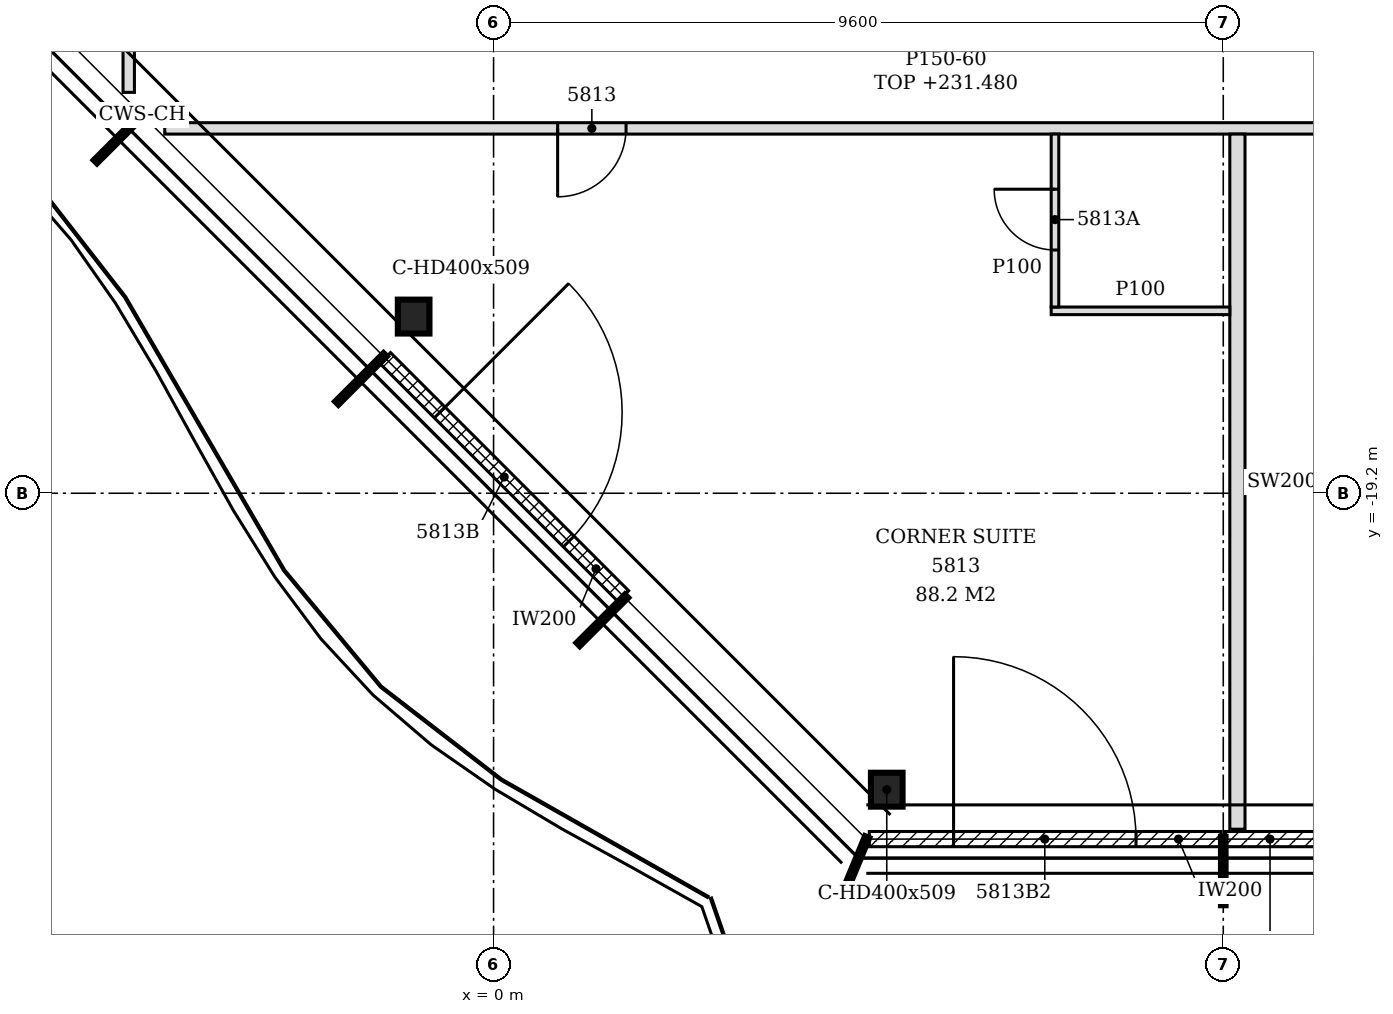
"""IFC4 building model, lengths in metres.
Left out: names, types, materials, properties, quantities, classifications, styles, units other than length and angle.
Written with IfcOpenShell. Run it as: python <this file> out.ifc"""

import sys

from ifc_helpers import new_model, si_unit, direction, frame, frame_2d, origin, origin_2d, place, context, subcontext, project, spatial, polyline, rectangle, i_section, outline, extrude, element, fill, save


model = new_model("IFC4")
c1 = context("Model", 3, precision=1e-05, world=origin(), true_north=direction((0.0, 1.0)))
c2 = subcontext(c1, "Body", "Model", "MODEL_VIEW")
j1 = project(units=[si_unit("LENGTHUNIT", "METRE"), si_unit("PLANEANGLEUNIT", "RADIAN")], contexts=[c1])
p1 = place(None, origin())
s1 = spatial("IfcSite", under=j1, at=p1, CompositionType="ELEMENT")
p2 = place(p1, origin())
s2 = spatial("IfcBuilding", under=s1, at=p2, CompositionType="ELEMENT")
p3 = place(p2, frame((0.0, 0.0, 228.6)))
s3 = spatial("IfcBuildingStorey", under=s2, at=p3, CompositionType="ELEMENT", Elevation=228.6)
for number, where, z_axis, x_axis in (
    (1, (5.173, -23.1, -0.15), (0.0, 0.0, 1.0), (1.0, 0.0, 0.0)),
    (2, (-1.052, -16.876, -0.15), (0.0, 0.0, 1.0), (1.0, 0.0, 0.0)),
):
    element("IfcColumn", number, at=place(p3, frame(where, z_axis=z_axis, x_axis=x_axis)), inside=s3, PredefinedType="COLUMN", context=c2, shape_type="SweptSolid", body=[
        extrude(i_section(OverallWidth=0.416, OverallDepth=0.446, WebThickness=0.039, FlangeThickness=0.063, FilletRadius=0.015, at=origin_2d()), origin(), (0.0, 0.0, 1.0), 3.6),
    ])
p4 = place(p3, frame((4.944, -23.75, 0.0), z_axis=(0.0, 0.0, 1.0), x_axis=(1.0, 0.0, 0.0)))
e3 = element("IfcWall", 3, at=p4, inside=s3, PredefinedType="NOTDEFINED", context=c2, shape_type="SweptSolid", body=[
    extrude(rectangle(XDim=4.626, YDim=0.2, at=frame_2d((2.313, 0.0))), origin(), (0.0, 0.0, 1.0), 3.45),
])
p5 = place(p4, frame((1.108, 0.0, 0.0)))
e4 = element("IfcOpeningElement", 4, at=p5, cuts=e3, PredefinedType="OPENING", context=c2, shape_type="SweptSolid", body=[
    extrude(rectangle(XDim=2.4, YDim=2.4, at=frame_2d((1.2, 1.2))), frame((0.0, 0.11, 0.0), z_axis=(0.0, -1.0, 0.0), x_axis=(1.0, 0.0, 0.0)), (0.0, 0.0, 1.0), 0.22),
])
p6 = place(p3, frame((9.63, -23.75, 0.0), z_axis=(0.0, 0.0, 1.0), x_axis=(1.0, 0.0, 0.0)))
e5 = element("IfcWall", 5, at=p6, inside=s3, PredefinedType="NOTDEFINED", context=c2, shape_type="SweptSolid", body=[
    extrude(rectangle(XDim=4.74, YDim=0.2, at=frame_2d((2.37, 0.0))), origin(), (0.0, 0.0, 1.0), 3.45),
])
p7 = place(p6, frame((1.17, 0.0, 0.0)))
e6 = element("IfcOpeningElement", 6, at=p7, cuts=e5, PredefinedType="OPENING", context=c2, shape_type="SweptSolid", body=[
    extrude(rectangle(XDim=2.4, YDim=2.4, at=frame_2d((1.2, 1.2))), frame((0.0, 0.11, 0.0), z_axis=(0.0, -1.0, 0.0), x_axis=(1.0, 0.0, 0.0)), (0.0, 0.0, 1.0), 0.22),
])
p8 = place(p3, frame((-1.427, -17.42, 0.0), z_axis=(0.0, 0.0, 1.0), x_axis=(0.707106781187, -0.707106781187, 0.0)))
e7 = element("IfcWall", 7, at=p8, inside=s3, PredefinedType="NOTDEFINED", context=c2, shape_type="SweptSolid", body=[
    extrude(rectangle(XDim=4.431, YDim=0.2, at=frame_2d((2.216, 0.0))), origin(), (0.0, 0.0, 1.0), 3.45),
])
p9 = place(p8, frame((1.015, 0.0, 0.0)))
e8 = element("IfcOpeningElement", 8, at=p9, cuts=e7, PredefinedType="OPENING", context=c2, shape_type="SweptSolid", body=[
    extrude(rectangle(XDim=2.4, YDim=2.4, at=frame_2d((1.2, 1.2))), frame((0.0, 0.11, 0.0), z_axis=(0.0, -1.0, 0.0), x_axis=(1.0, 0.0, 0.0)), (0.0, 0.0, 1.0), 0.22),
])
p10 = place(p3, frame((9.786, -23.62, 0.0), z_axis=(0.0, 0.0, 1.0), x_axis=(0.0, 1.0, 0.0)))
e9 = element("IfcWall", 9, at=p10, inside=s3, PredefinedType="PARTITIONING", context=c2, shape_type="SweptSolid", body=[
    extrude(outline(polyline([(0.0, 0.0), (9.145, 0.0), (9.145, 2.88), (9.115, 2.88), (9.113, 3.45), (4.525, 3.45), (4.523, 2.88), (4.315, 2.88), (4.313, 3.45), (0.67, 3.45), (0.668, 2.93), (0.37, 2.93), (0.368, 3.45), (0.0, 3.45), (0.0, 0.0)])), frame((0.0, 0.1, 0.0), z_axis=(0.0, -1.0, 0.0), x_axis=(1.0, 0.0, 0.0)), (0.0, 0.0, 1.0), 0.2),
])
p11 = place(p3, frame((7.336, -16.8, 0.0), z_axis=(0.0, 0.0, 1.0), x_axis=(1.0, 0.0, 0.0)))
e10 = element("IfcWall", 10, at=p11, inside=s3, PredefinedType="PARTITIONING", context=c2, shape_type="SweptSolid", body=[
    extrude(outline(polyline([(0.0, 0.0), (2.35, 0.0), (2.35, 3.45), (0.014, 3.45), (0.012, 2.73), (0.0, 2.73), (0.0, 0.0)])), frame((0.0, 0.05, 0.0), z_axis=(0.0, -1.0, 0.0), x_axis=(1.0, 0.0, 0.0)), (0.0, 0.0, 1.0), 0.1),
])
p12 = place(p3, frame((7.386, -16.75, 0.0), z_axis=(0.0, 0.0, 1.0), x_axis=(0.0, 1.0, 0.0)))
e11 = element("IfcWall", 11, at=p12, inside=s3, PredefinedType="PARTITIONING", context=c2, shape_type="SweptSolid", body=[
    extrude(outline(polyline([(0.0, 0.0), (2.275, 0.0), (2.275, 2.88), (2.245, 2.88), (2.243, 3.45), (0.0, 3.45), (0.0, 0.0)])), frame((0.0, 0.05, 0.0), z_axis=(0.0, -1.0, 0.0), x_axis=(1.0, 0.0, 0.0)), (0.0, 0.0, 1.0), 0.1),
])
p13 = place(p12, frame((0.75, 0.0, 0.0)))
e12 = element("IfcOpeningElement", 12, at=p13, cuts=e11, PredefinedType="OPENING", context=c2, shape_type="SweptSolid", body=[
    extrude(rectangle(XDim=0.8, YDim=2.1, at=frame_2d((0.4, 1.05))), frame((0.0, 0.06, 0.0), z_axis=(0.0, -1.0, 0.0), x_axis=(1.0, 0.0, 0.0)), (0.0, 0.0, 1.0), 0.12),
])
p14 = place(p3, frame((-4.326, -14.4, 0.0), z_axis=(0.0, 0.0, 1.0), x_axis=(1.0, 0.0, 0.0)))
e13 = element("IfcWall", 13, at=p14, inside=s3, PredefinedType="PARTITIONING", context=c2, shape_type="SweptSolid", body=[
    extrude(outline(polyline([(0.0, 0.0), (21.026, 0.0), (21.026, 2.88), (11.676, 2.88), (11.674, 2.73), (11.376, 2.73), (11.374, 2.88), (1.369, 2.88), (1.367, 2.63), (0.229, 2.63), (0.227, 2.88), (0.0, 2.88), (0.0, 0.0)])), frame((0.0, 0.075, 0.0), z_axis=(0.0, -1.0, 0.0), x_axis=(1.0, 0.0, 0.0)), (0.0, 0.0, 1.0), 0.15),
])
p15 = place(p14, frame((5.169, 0.0, 0.0)))
e14 = element("IfcOpeningElement", 14, at=p15, cuts=e13, PredefinedType="OPENING", context=c2, shape_type="SweptSolid", body=[
    extrude(rectangle(XDim=0.9, YDim=2.1, at=frame_2d((0.45, 1.05))), frame((0.0, 0.085, 0.0), z_axis=(0.0, -1.0, 0.0), x_axis=(1.0, 0.0, 0.0)), (0.0, 0.0, 1.0), 0.17),
])
p16 = place(p14, frame((15.969, 0.0, 0.0)))
e15 = element("IfcOpeningElement", 15, at=p16, cuts=e13, PredefinedType="OPENING", context=c2, shape_type="SweptSolid", body=[
    extrude(rectangle(XDim=0.9, YDim=2.1, at=frame_2d((0.45, 1.05))), frame((0.0, 0.085, 0.0), z_axis=(0.0, -1.0, 0.0), x_axis=(1.0, 0.0, 0.0)), (0.0, 0.0, 1.0), 0.17),
])
p17 = place(p3, frame((-4.8, -13.926, 0.0), z_axis=(0.0, 0.0, 1.0), x_axis=(0.0, 1.0, 0.0)))
e16 = element("IfcWall", 16, at=p17, inside=s3, PredefinedType="PARTITIONING", context=c2, shape_type="SweptSolid", body=[
    extrude(outline(polyline([(0.0, 0.0), (2.92, 0.0), (2.92, 3.03), (1.369, 3.03), (1.367, 2.63), (0.229, 2.63), (0.227, 3.03), (0.0, 3.03), (0.0, 0.0)])), frame((0.0, 0.075, 0.0), z_axis=(0.0, -1.0, 0.0), x_axis=(1.0, 0.0, 0.0)), (0.0, 0.0, 1.0), 0.15),
])
p18 = place(p5, origin())
e17 = element("IfcDoor", 17, at=p18, inside=s3, OperationType="SINGLE_SWING_LEFT", PredefinedType="DOOR", context=c2, shape_type="SweptSolid", body=[
    extrude(rectangle(XDim=2.4, YDim=2.4, at=frame_2d((1.2, 1.2))), frame((0.0, 0.025, 0.0), z_axis=(0.0, -1.0, 0.0), x_axis=(1.0, 0.0, 0.0)), (0.0, 0.0, 1.0), 0.05),
])
fill(e4, e17)
p19 = place(p9, origin())
e18 = element("IfcDoor", 18, at=p19, inside=s3, OperationType="SINGLE_SWING_LEFT", PredefinedType="DOOR", context=c2, shape_type="SweptSolid", body=[
    extrude(rectangle(XDim=2.4, YDim=2.4, at=frame_2d((1.2, 1.2))), frame((0.0, 0.025, 0.0), z_axis=(0.0, -1.0, 0.0), x_axis=(1.0, 0.0, 0.0)), (0.0, 0.0, 1.0), 0.05),
])
fill(e8, e18)
p20 = place(p15, frame((0.9, 0.0, 0.0), z_axis=(0.0, 0.0, 1.0), x_axis=(-1.0, 0.0, 0.0)))
e19 = element("IfcDoor", 19, at=p20, inside=s3, OperationType="SINGLE_SWING_RIGHT", PredefinedType="DOOR", context=c2, shape_type="SweptSolid", body=[
    extrude(rectangle(XDim=0.9, YDim=2.1, at=frame_2d((0.45, 1.05))), frame((0.0, 0.025, 0.0), z_axis=(0.0, -1.0, 0.0), x_axis=(1.0, 0.0, 0.0)), (0.0, 0.0, 1.0), 0.05),
])
fill(e14, e19)
p21 = place(p13, origin())
e20 = element("IfcDoor", 20, at=p21, inside=s3, OperationType="SINGLE_SWING_RIGHT", PredefinedType="DOOR", context=c2, shape_type="SweptSolid", body=[
    extrude(rectangle(XDim=0.8, YDim=2.1, at=frame_2d((0.4, 1.05))), frame((0.0, 0.025, 0.0), z_axis=(0.0, -1.0, 0.0), x_axis=(1.0, 0.0, 0.0)), (0.0, 0.0, 1.0), 0.05),
])
fill(e12, e20)
save(model, sys.argv[1])
